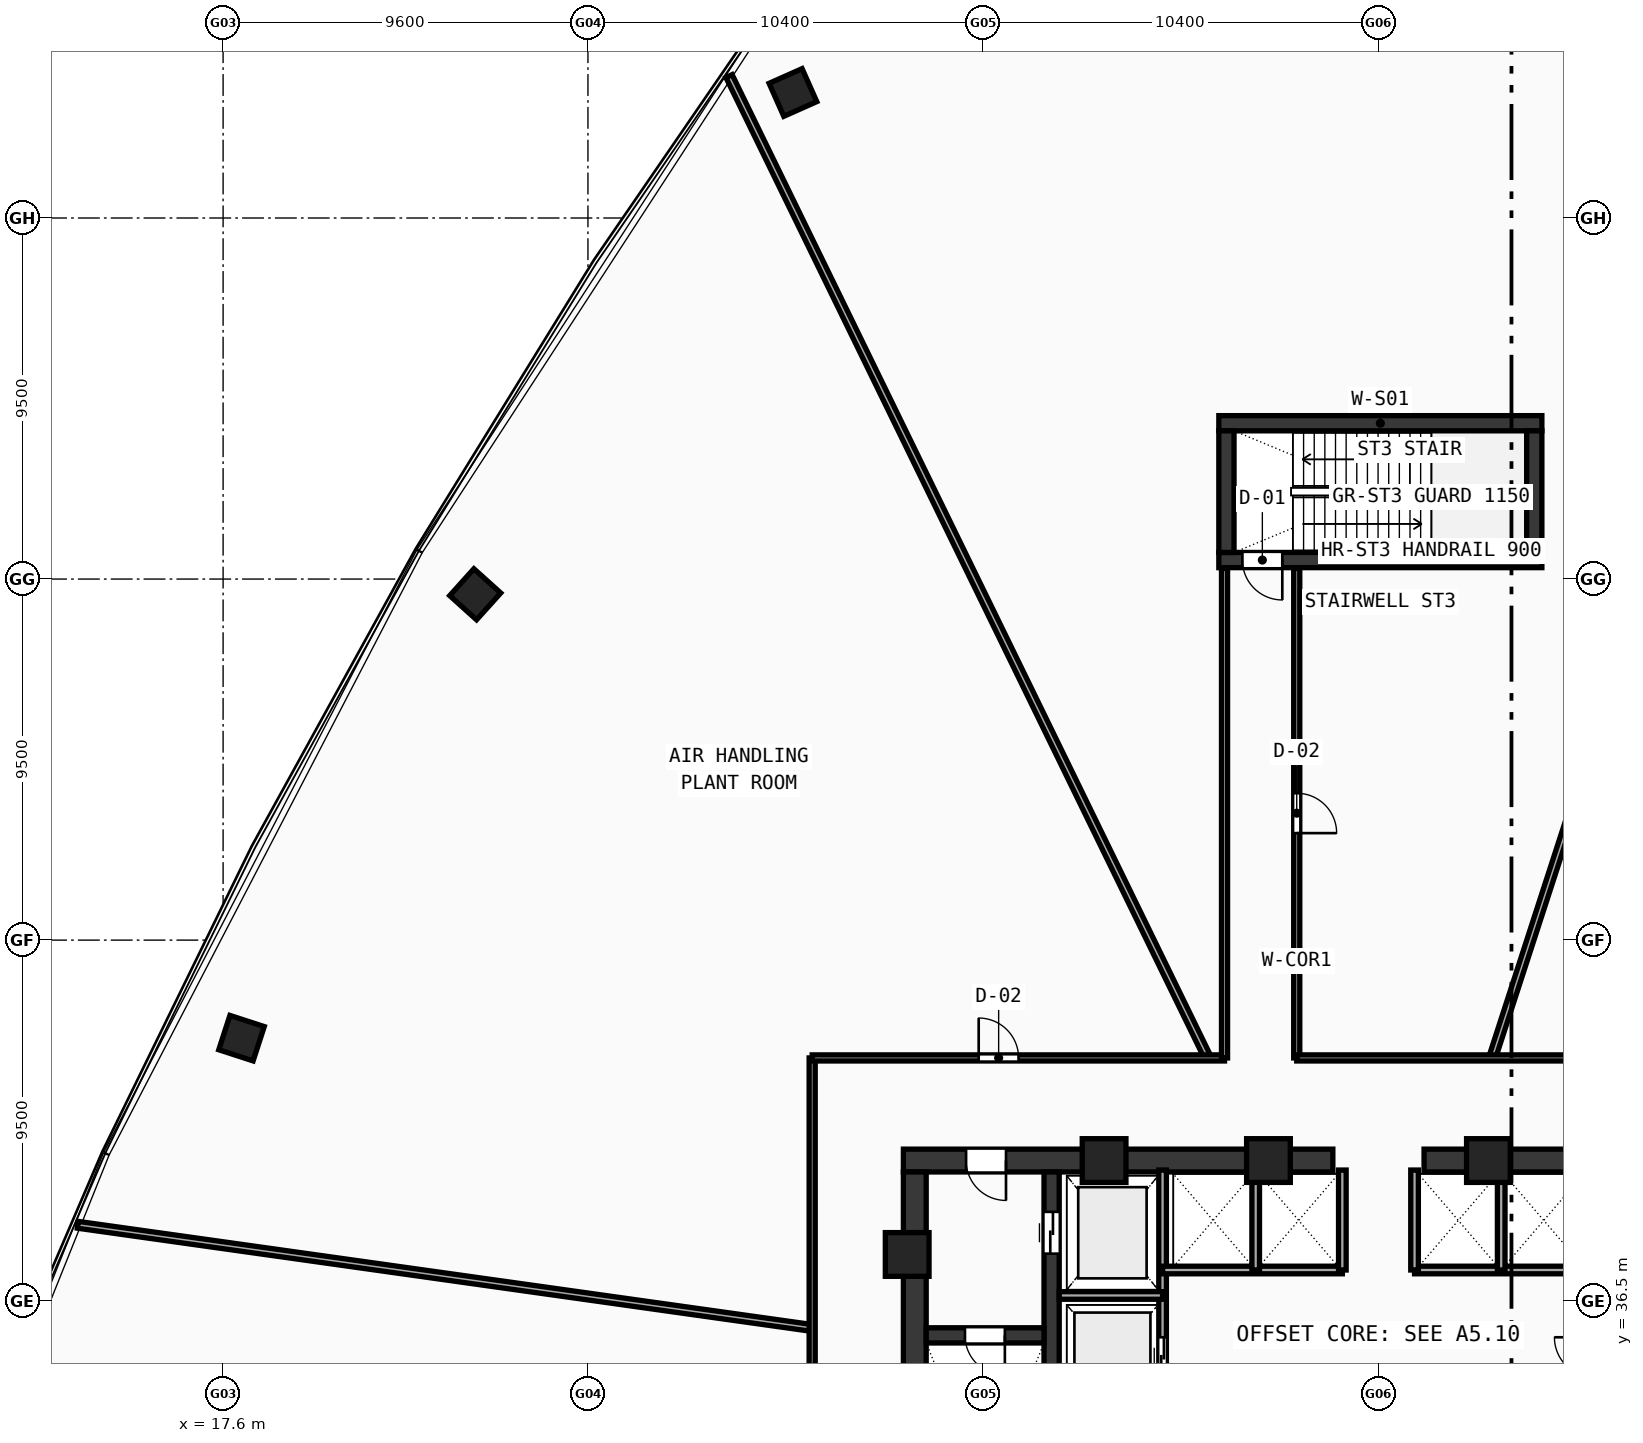
"""IFC4 building model, lengths in metres.
Left out: names, types, materials, properties, quantities, classifications, styles, units other than length and angle.
Written with IfcOpenShell. Run it as: python <this file> out.ifc"""

import sys

from ifc_helpers import new_model, si_unit, direction, frame, frame_2d, origin, origin_with_axes, origin_2d, place, context, subcontext, project, spatial, rectangle, hollow_rectangle, extrude, source, transform, mapped, element, fill, save


model = new_model("IFC4")
c1 = context("Model", 3, precision=1e-05, world=origin(), true_north=direction((0.0, 1.0)))
c2 = subcontext(c1, "Body", "Model", "MODEL_VIEW")
j1 = project(units=[si_unit("LENGTHUNIT", "METRE"), si_unit("PLANEANGLEUNIT", "RADIAN")], contexts=[c1])
p1 = place(None, origin())
s1 = spatial("IfcSite", under=j1, at=p1, CompositionType="ELEMENT")
p2 = place(p1, origin())
s2 = spatial("IfcBuilding", under=s1, at=p2, CompositionType="ELEMENT")
p3 = place(p2, frame((0.0, 0.0, 125.03)))
s3 = spatial("IfcBuildingStorey", under=s2, at=p3, CompositionType="ELEMENT", Elevation=125.03)
p4 = place(p3, frame((35.5, 40.2, 0.0), z_axis=(0.0, 0.0, 1.0), x_axis=(1.0, 0.0, 0.0)))
e1 = element("IfcWall", 1, at=p4, inside=s3, PredefinedType="SHEAR", context=c2, shape_type="SweptSolid", body=[
    extrude(rectangle(XDim=11.3, YDim=0.6, at=frame_2d((5.65, 0.0))), origin(), (0.0, 0.0, 1.0), 4.54),
])
p5 = place(p4, frame((1.65, 0.0, 0.0)))
e2 = element("IfcOpeningElement", 2, at=p5, cuts=e1, PredefinedType="OPENING", context=c2, shape_type="SweptSolid", body=[
    extrude(rectangle(XDim=1.05, YDim=2.1, at=frame_2d((0.525, 1.05))), frame((0.0, 0.31, 0.0), z_axis=(0.0, -1.0, 0.0), x_axis=(1.0, 0.0, 0.0)), (0.0, 0.0, 1.0), 0.62),
])
p6 = place(p3, frame((49.2, 40.2, 0.0), z_axis=(0.0, 0.0, 1.0), x_axis=(1.0, 0.0, 0.0)))
e3 = element("IfcWall", 3, at=p6, inside=s3, PredefinedType="SHEAR", context=c2, shape_type="SweptSolid", body=[
    extrude(rectangle(XDim=11.3, YDim=0.6, at=frame_2d((5.65, 0.0))), origin(), (0.0, 0.0, 1.0), 4.54),
])
p7 = place(p6, frame((8.6, 0.0, 0.0)))
e4 = element("IfcOpeningElement", 4, at=p7, cuts=e3, PredefinedType="OPENING", context=c2, shape_type="SweptSolid", body=[
    extrude(rectangle(XDim=1.05, YDim=2.1, at=frame_2d((0.525, 1.05))), frame((0.0, 0.31, 0.0), z_axis=(0.0, -1.0, 0.0), x_axis=(1.0, 0.0, 0.0)), (0.0, 0.0, 1.0), 0.62),
])
p8 = place(p3, frame((35.8, 27.8, 0.0), z_axis=(0.0, 0.0, 1.0), x_axis=(0.0, 1.0, 0.0)))
e5 = element("IfcWall", 5, at=p8, inside=s3, PredefinedType="SHEAR", context=c2, shape_type="SweptSolid", body=[
    extrude(rectangle(XDim=12.1, YDim=0.6, at=frame_2d((6.05, 0.0))), origin(), (0.0, 0.0, 1.0), 4.54),
])
p9 = place(p3, frame((39.4, 27.8, 0.0), z_axis=(0.0, 0.0, 1.0), x_axis=(0.0, 1.0, 0.0)))
e6 = element("IfcWall", 6, at=p9, inside=s3, PredefinedType="SHEAR", context=c2, shape_type="SweptSolid", body=[
    extrude(rectangle(XDim=12.1, YDim=0.4, at=frame_2d((6.05, 0.0))), origin(), (0.0, 0.0, 1.0), 4.54),
])
p10 = place(p9, frame((9.95, 0.0, 0.0)))
e7 = element("IfcOpeningElement", 7, at=p10, cuts=e6, PredefinedType="OPENING", context=c2, shape_type="SweptSolid", body=[
    extrude(rectangle(XDim=1.1, YDim=2.1, at=frame_2d((0.55, 1.05))), frame((0.0, 0.21, 0.0), z_axis=(0.0, -1.0, 0.0), x_axis=(1.0, 0.0, 0.0)), (0.0, 0.0, 1.0), 0.42),
])
p11 = place(p3, frame((36.1, 35.6, 0.0), z_axis=(0.0, 0.0, 1.0), x_axis=(1.0, 0.0, 0.0)))
e8 = element("IfcWall", 8, at=p11, inside=s3, PredefinedType="SHEAR", context=c2, shape_type="SweptSolid", body=[
    extrude(rectangle(XDim=3.1, YDim=0.4, at=frame_2d((1.55, 0.0))), origin(), (0.0, 0.0, 1.0), 4.54),
])
p12 = place(p11, frame((1.02, 0.0, 0.0)))
e9 = element("IfcOpeningElement", 9, at=p12, cuts=e8, PredefinedType="OPENING", context=c2, shape_type="SweptSolid", body=[
    extrude(rectangle(XDim=1.05, YDim=2.1, at=frame_2d((0.525, 1.05))), frame((0.0, 0.21, 0.0), z_axis=(0.0, -1.0, 0.0), x_axis=(1.0, 0.0, 0.0)), (0.0, 0.0, 1.0), 0.42),
])
p13 = place(p3, frame((43.8, 59.6, 0.0), z_axis=(0.0, 0.0, 1.0), x_axis=(1.0, 0.0, 0.0)))
e10 = element("IfcWall", 10, at=p13, inside=s3, PredefinedType="SHEAR", context=c2, shape_type="SweptSolid", body=[
    extrude(rectangle(XDim=8.5, YDim=0.4, at=frame_2d((4.25, 0.0))), origin(), (0.0, 0.0, 1.0), 4.54),
])
p14 = place(p3, frame((43.8, 56.0, 0.0), z_axis=(0.0, 0.0, 1.0), x_axis=(1.0, 0.0, 0.0)))
e11 = element("IfcWall", 11, at=p14, inside=s3, PredefinedType="SHEAR", context=c2, shape_type="SweptSolid", body=[
    extrude(rectangle(XDim=8.5, YDim=0.4, at=frame_2d((4.25, 0.0))), origin(), (0.0, 0.0, 1.0), 4.54),
])
p15 = place(p14, frame((0.62, 0.0, 0.0)))
e12 = element("IfcOpeningElement", 12, at=p15, cuts=e11, PredefinedType="OPENING", context=c2, shape_type="SweptSolid", body=[
    extrude(rectangle(XDim=1.05, YDim=2.1, at=frame_2d((0.525, 1.05))), frame((0.0, 0.21, 0.0), z_axis=(0.0, -1.0, 0.0), x_axis=(1.0, 0.0, 0.0)), (0.0, 0.0, 1.0), 0.42),
])
for number, where, z_axis, x_axis in (
    (13, (44.0, 56.2, 0.0), (0.0, 0.0, 1.0), (0.0, 1.0, 0.0)),
    (14, (52.1, 56.2, 0.0), (0.0, 0.0, 1.0), (0.0, 1.0, 0.0)),
):
    element("IfcWall", number, at=place(p3, frame(where, z_axis=z_axis, x_axis=x_axis)), inside=s3, PredefinedType="SHEAR", context=c2, shape_type="SweptSolid", body=[
        extrude(rectangle(XDim=3.2, YDim=0.4, at=frame_2d((1.6, 0.0))), origin(), (0.0, 0.0, 1.0), 4.54),
    ])
m1 = source(origin(), c2, "Body", "SweptSolid", [
    extrude(hollow_rectangle(XDim=1.15, YDim=1.15, WallThickness=0.048, at=origin_2d()), origin(), (0.0, 0.0, 1.0), 4.82),
])
for number, where, z_axis, x_axis in (
    (15, (50.894, 40.2, -0.28), (0.0, 0.0, 1.0), (1.0, 0.0, 0.0)),
    (16, (45.106, 40.2, -0.28), (0.0, 0.0, 1.0), (1.0, 0.0, 0.0)),
    (17, (40.781, 40.2, -0.28), (0.0, 0.0, 1.0), (1.0, 0.0, 0.0)),
    (18, (35.6, 37.729, -0.28), (0.0, 0.0, 1.0), (1.0, 0.0, 0.0)),
):
    element("IfcColumn", number, at=place(p3, frame(where, z_axis=z_axis, x_axis=x_axis)), inside=s3, PredefinedType="COLUMN", context=c2, shape_type="MappedRepresentation", body=[
        mapped(m1, transform((0.0, 0.0, 0.0), scale=1.0)),
    ])
m2 = source(origin(), c2, "Body", "SweptSolid", [
    extrude(hollow_rectangle(XDim=0.95, YDim=0.95, WallThickness=0.04, at=origin_2d()), origin(), (0.0, 0.0, 1.0), 4.82),
])
for number, where, z_axis, x_axis in (
    (19, (32.594, 68.303, -0.28), (0.0, 0.0, 1.0), (-0.914, -0.407, 0.0)),
    (20, (24.234, 55.099, -0.28), (0.0, 0.0, 1.0), (-0.669, -0.743, 0.0)),
    (21, (18.085, 43.42, -0.28), (0.0, 0.0, 1.0), (-0.309, -0.951, 0.0)),
):
    element("IfcColumn", number, at=place(p3, frame(where, z_axis=z_axis, x_axis=x_axis)), inside=s3, PredefinedType="COLUMN", context=c2, shape_type="MappedRepresentation", body=[
        mapped(m2, transform((0.0, 0.0, 0.0), scale=1.0)),
    ])
p16 = place(p3, frame((42.32, 33.5, 0.0), z_axis=(0.0, 0.0, 1.0), x_axis=(0.0, 1.0, 0.0)))
e22 = element("IfcWall", 22, at=p16, inside=s3, PredefinedType="SOLIDWALL", context=c2, shape_type="SweptSolid", body=[
    extrude(rectangle(XDim=6.45, YDim=0.2, at=frame_2d((3.225, 0.0))), origin(), (0.0, 0.0, 1.0), 4.54),
])
p17 = place(p16, frame((1.0, 0.0, 0.0)))
e23 = element("IfcOpeningElement", 23, at=p17, cuts=e22, PredefinedType="OPENING", context=c2, shape_type="SweptSolid", body=[
    extrude(rectangle(XDim=1.05, YDim=2.1, at=frame_2d((0.525, 1.05))), frame((0.0, 0.11, 0.0), z_axis=(0.0, -1.0, 0.0), x_axis=(1.0, 0.0, 0.0)), (0.0, 0.0, 1.0), 0.22),
])
p18 = place(p3, frame((39.6, 36.65, 0.0), z_axis=(0.0, 0.0, 1.0), x_axis=(1.0, 0.0, 0.0)))
e24 = element("IfcWall", 24, at=p18, inside=s3, PredefinedType="SOLIDWALL", context=c2, shape_type="SweptSolid", body=[
    extrude(rectangle(XDim=2.72, YDim=0.2, at=frame_2d((1.36, 0.0))), origin(), (0.0, 0.0, 1.0), 4.54),
])
for number, where, z_axis, x_axis in (
    (25, (42.32, 37.32, 0.0), (0.0, 0.0, 1.0), (1.0, 0.0, 0.0)),
    (26, (48.95, 37.32, 0.0), (0.0, 0.0, 1.0), (1.0, 0.0, 0.0)),
):
    element("IfcWall", number, at=place(p3, frame(where, z_axis=z_axis, x_axis=x_axis)), inside=s3, PredefinedType="SOLIDWALL", context=c2, shape_type="SweptSolid", body=[
        extrude(rectangle(XDim=4.73, YDim=0.2, at=frame_2d((2.365, 0.0))), origin(), (0.0, 0.0, 1.0), 4.54),
    ])
for number, where, z_axis, x_axis in (
    (27, (47.05, 37.32, 0.0), (0.0, 0.0, 1.0), (0.0, 1.0, 0.0)),
    (28, (48.95, 37.32, 0.0), (0.0, 0.0, 1.0), (0.0, 1.0, 0.0)),
    (29, (44.77, 37.32, 0.0), (0.0, 0.0, 1.0), (0.0, 1.0, 0.0)),
    (30, (51.23, 37.32, 0.0), (0.0, 0.0, 1.0), (0.0, 1.0, 0.0)),
):
    element("IfcWall", number, at=place(p3, frame(where, z_axis=z_axis, x_axis=x_axis)), inside=s3, PredefinedType="SOLIDWALL", context=c2, shape_type="SweptSolid", body=[
        extrude(rectangle(XDim=2.63, YDim=0.2, at=frame_2d((1.315, 0.0))), origin(), (0.0, 0.0, 1.0), 4.54),
    ])
p19 = place(p3, frame((50.989, 42.9, 0.0), z_axis=(0.0, 0.0, 1.0), x_axis=(0.309014626383, 0.951057285699, 0.0)))
e31 = element("IfcWall", 31, at=p19, inside=s3, PredefinedType="PARTITIONING", context=c2, shape_type="SweptSolid", body=[
    extrude(rectangle(XDim=32.839, YDim=0.18, at=frame_2d((16.419, 0.0))), origin(), (0.0, 0.0, 1.0), 3.89),
])
p20 = place(p3, frame((43.513, 42.9, 0.0), z_axis=(0.0, 0.0, 1.0), x_axis=(-0.438371753417, 0.898793750427, 0.0)))
e32 = element("IfcWall", 32, at=p20, inside=s3, PredefinedType="PARTITIONING", context=c2, shape_type="SweptSolid", body=[
    extrude(rectangle(XDim=28.743, YDim=0.18, at=frame_2d((14.372, 0.0))), origin(), (0.0, 0.0, 1.0), 3.89),
])
p21 = place(p3, frame((33.1, 35.794, 0.0), z_axis=(0.0, 0.0, 1.0), x_axis=(-0.990268733373, 0.13916837178, 0.0)))
e33 = element("IfcWall", 33, at=p21, inside=s3, PredefinedType="PARTITIONING", context=c2, shape_type="SweptSolid", body=[
    extrude(rectangle(XDim=19.513, YDim=0.18, at=frame_2d((9.756, 0.0))), origin(), (0.0, 0.0, 1.0), 3.89),
])
p22 = place(p3, frame((45.85, 55.78, 0.0), z_axis=(0.0, 0.0, 1.0), x_axis=(0.0, -1.0, 0.0)))
e34 = element("IfcWall", 34, at=p22, inside=s3, PredefinedType="PARTITIONING", context=c2, shape_type="SweptSolid", body=[
    extrude(rectangle(XDim=12.88, YDim=0.16, at=frame_2d((6.44, 0.0))), origin(), (0.0, 0.0, 1.0), 4.14),
])
p23 = place(p22, frame((5.915, 0.0, 0.0)))
e35 = element("IfcOpeningElement", 35, at=p23, cuts=e34, PredefinedType="OPENING", context=c2, shape_type="SweptSolid", body=[
    extrude(rectangle(XDim=1.05, YDim=2.1, at=frame_2d((0.525, 1.05))), frame((0.0, 0.09, 0.0), z_axis=(0.0, -1.0, 0.0), x_axis=(1.0, 0.0, 0.0)), (0.0, 0.0, 1.0), 0.18),
])
p24 = place(p3, frame((45.85, 42.9, 0.0), z_axis=(0.0, 0.0, 1.0), x_axis=(1.0, 0.0, 0.0)))
e36 = element("IfcWall", 36, at=p24, inside=s3, PredefinedType="PARTITIONING", context=c2, shape_type="SweptSolid", body=[
    extrude(rectangle(XDim=17.05, YDim=0.16, at=frame_2d((8.525, 0.0))), origin(), (0.0, 0.0, 1.0), 3.89),
])
p25 = place(p24, frame((10.87, 0.0, 0.0)))
e37 = element("IfcOpeningElement", 37, at=p25, cuts=e36, PredefinedType="OPENING", context=c2, shape_type="SweptSolid", body=[
    extrude(rectangle(XDim=1.05, YDim=2.1, at=frame_2d((0.525, 1.05))), frame((0.0, 0.09, 0.0), z_axis=(0.0, -1.0, 0.0), x_axis=(1.0, 0.0, 0.0)), (0.0, 0.0, 1.0), 0.18),
])
p26 = place(p3, frame((33.1, 24.9, 0.0), z_axis=(0.0, 0.0, 1.0), x_axis=(0.0, 1.0, 0.0)))
e38 = element("IfcWall", 38, at=p26, inside=s3, PredefinedType="PARTITIONING", context=c2, shape_type="SweptSolid", body=[
    extrude(rectangle(XDim=18.0, YDim=0.16, at=frame_2d((9.0, 0.0))), origin(), (0.0, 0.0, 1.0), 3.89),
])
p27 = place(p26, frame((4.622, 0.0, 0.0)))
e39 = element("IfcOpeningElement", 39, at=p27, cuts=e38, PredefinedType="OPENING", context=c2, shape_type="SweptSolid", body=[
    extrude(rectangle(XDim=1.05, YDim=2.1, at=frame_2d((0.525, 1.05))), frame((0.0, 0.09, 0.0), z_axis=(0.0, -1.0, 0.0), x_axis=(1.0, 0.0, 0.0)), (0.0, 0.0, 1.0), 0.18),
])
p28 = place(p3, frame((33.1, 42.9, 0.0), z_axis=(0.0, 0.0, 1.0), x_axis=(1.0, 0.0, 0.0)))
e40 = element("IfcWall", 40, at=p28, inside=s3, PredefinedType="PARTITIONING", context=c2, shape_type="SweptSolid", body=[
    extrude(rectangle(XDim=10.85, YDim=0.16, at=frame_2d((5.425, 0.0))), origin(), (0.0, 0.0, 1.0), 3.89),
])
p29 = place(p28, frame((4.381, 0.0, 0.0)))
e41 = element("IfcOpeningElement", 41, at=p29, cuts=e40, PredefinedType="OPENING", context=c2, shape_type="SweptSolid", body=[
    extrude(rectangle(XDim=1.05, YDim=2.1, at=frame_2d((0.525, 1.05))), frame((0.0, 0.09, 0.0), z_axis=(0.0, -1.0, 0.0), x_axis=(1.0, 0.0, 0.0)), (0.0, 0.0, 1.0), 0.18),
])
p30 = place(p3, frame((43.95, 42.9, 0.0), z_axis=(0.0, 0.0, 1.0), x_axis=(0.0, 1.0, 0.0)))
e42 = element("IfcWall", 42, at=p30, inside=s3, PredefinedType="PARTITIONING", context=c2, shape_type="SweptSolid", body=[
    extrude(rectangle(XDim=12.88, YDim=0.16, at=frame_2d((6.44, 0.0))), origin(), (0.0, 0.0, 1.0), 3.89),
])
m3 = source(origin(), c2, "Body", "SweptSolid", [
    extrude(rectangle(XDim=1.05, YDim=2.1, at=frame_2d((0.525, 1.05))), frame((0.0, 0.025, 0.0), z_axis=(0.0, -1.0, 0.0), x_axis=(1.0, 0.0, 0.0)), (0.0, 0.0, 1.0), 0.05),
])
p31 = place(p12, frame((1.05, 0.0, 0.0), z_axis=(0.0, 0.0, 1.0), x_axis=(-1.0, 0.0, 0.0)))
e43 = element("IfcDoor", 43, at=p31, inside=s3, OperationType="SINGLE_SWING_LEFT", PredefinedType="DOOR", context=c2, shape_type="MappedRepresentation", body=[
    mapped(m3, transform((0.0, 0.0, 0.0), scale=1.0)),
])
fill(e9, e43)
p32 = place(p5, frame((1.05, 0.0, 0.0), z_axis=(0.0, 0.0, 1.0), x_axis=(-1.0, 0.0, 0.0)))
e44 = element("IfcDoor", 44, at=p32, inside=s3, OperationType="SINGLE_SWING_LEFT", PredefinedType="DOOR", context=c2, shape_type="MappedRepresentation", body=[
    mapped(m3, transform((0.0, 0.0, 0.0), scale=1.0)),
])
fill(e2, e44)
m4 = source(origin(), c2, "Body", "SweptSolid", [
    extrude(rectangle(XDim=1.1, YDim=2.1, at=frame_2d((0.55, 1.05))), frame((0.0, 0.025, 0.0), z_axis=(0.0, -1.0, 0.0), x_axis=(1.0, 0.0, 0.0)), (0.0, 0.0, 1.0), 0.05),
])
p33 = place(p10, frame((1.1, 0.0, 0.0), z_axis=(0.0, 0.0, 1.0), x_axis=(-1.0, 0.0, 0.0)))
e45 = element("IfcDoor", 45, at=p33, inside=s3, OperationType="DOUBLE_DOOR_SLIDING", PredefinedType="DOOR", context=c2, shape_type="MappedRepresentation", body=[
    mapped(m4, transform((0.0, 0.0, 0.0), scale=1.0)),
])
fill(e7, e45)
p34 = place(p17, origin_with_axes())
e46 = element("IfcDoor", 46, at=p34, inside=s3, OperationType="DOUBLE_DOOR_SLIDING", PredefinedType="DOOR", context=c2, shape_type="MappedRepresentation", body=[
    mapped(m3, transform((0.0, 0.0, 0.0), scale=1.0)),
])
fill(e23, e46)
p35 = place(p15, frame((1.05, 0.0, 0.0), z_axis=(0.0, 0.0, 1.0), x_axis=(-1.0, 0.0, 0.0)))
e47 = element("IfcDoor", 47, at=p35, inside=s3, OperationType="SINGLE_SWING_LEFT", PredefinedType="DOOR", context=c2, shape_type="MappedRepresentation", body=[
    mapped(m3, transform((0.0, 0.0, 0.0), scale=1.0)),
])
fill(e12, e47)
p36 = place(p23, origin_with_axes())
e48 = element("IfcDoor", 48, at=p36, inside=s3, OperationType="SINGLE_SWING_RIGHT", PredefinedType="DOOR", context=c2, shape_type="MappedRepresentation", body=[
    mapped(m3, transform((0.0, 0.0, 0.0), scale=1.0)),
])
fill(e35, e48)
p37 = place(p29, origin_with_axes())
e49 = element("IfcDoor", 49, at=p37, inside=s3, OperationType="SINGLE_SWING_LEFT", PredefinedType="DOOR", context=c2, shape_type="MappedRepresentation", body=[
    mapped(m3, transform((0.0, 0.0, 0.0), scale=1.0)),
])
fill(e41, e49)
save(model, sys.argv[1])
